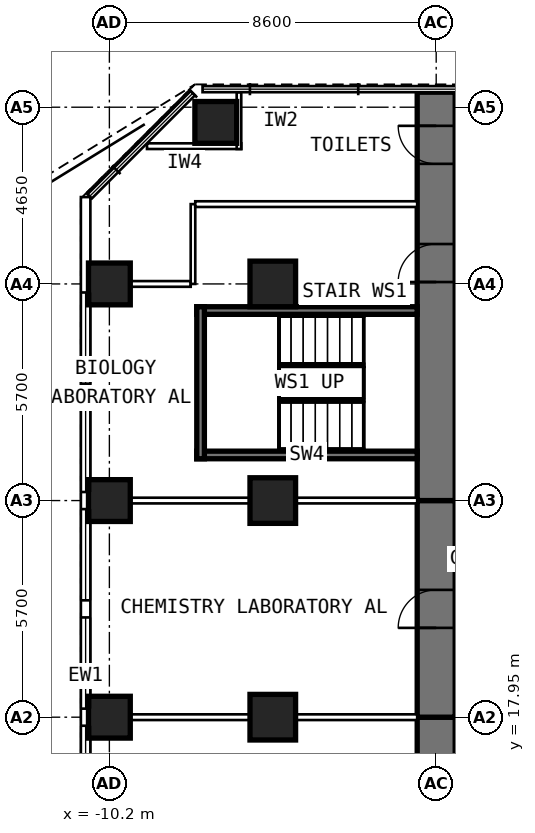
"""IFC4 building model, lengths in metres.
Left out: names, types, materials, properties, quantities, classifications, styles, units other than length and angle.
Written with IfcOpenShell. Run it as: python <this file> out.ifc"""

import sys

from ifc_helpers import new_model, si_unit, direction, frame, frame_2d, origin, origin_2d, place, context, subcontext, project, spatial, rectangle, extrude, element, fill, save


model = new_model("IFC4")
c1 = context("Model", 3, precision=1e-05, world=origin(), true_north=direction((0.0, 1.0)))
c2 = subcontext(c1, "Body", "Model", "MODEL_VIEW")
j1 = project(units=[si_unit("LENGTHUNIT", "METRE"), si_unit("PLANEANGLEUNIT", "RADIAN")], contexts=[c1])
p1 = place(None, origin())
s1 = spatial("IfcSite", under=j1, at=p1, CompositionType="ELEMENT")
p2 = place(p1, origin())
s2 = spatial("IfcBuilding", under=s1, at=p2, CompositionType="ELEMENT")
p3 = place(p2, frame((0.0, 0.0, 20.4)))
s3 = spatial("IfcBuildingStorey", under=s2, at=p3, CompositionType="ELEMENT", Elevation=20.4)
for number, where, z_axis, x_axis in (
    (1, (-10.2, 17.95, 0.0), (0.0, 0.0, 1.0), (0.0, 1.0, 0.0)),
    (2, (-10.2, 23.65, 0.0), (0.0, 0.0, 1.0), (0.0, 1.0, 0.0)),
    (3, (-10.2, 29.35, 0.0), (0.0, 0.0, 1.0), (0.0, 1.0, 0.0)),
    (4, (-7.4, 33.6, 0.0), (0.0, 0.0, 1.0), (0.0, 1.0, 0.0)),
):
    element("IfcColumn", number, at=place(p3, frame(where, z_axis=z_axis, x_axis=x_axis)), inside=s3, PredefinedType="COLUMN", context=c2, shape_type="SweptSolid", body=[
        extrude(rectangle(XDim=1.1, YDim=1.1, at=origin_2d()), origin(), (0.0, 0.0, 1.0), 4.8),
    ])
for number, where, z_axis, x_axis in (
    (5, (-5.9, 17.95, 0.0), (0.0, 0.0, 1.0), (0.0, 1.0, 0.0)),
    (6, (-5.9, 23.65, 0.0), (0.0, 0.0, 1.0), (0.0, 1.0, 0.0)),
    (7, (-5.9, 29.35, 0.0), (0.0, 0.0, 1.0), (0.0, 1.0, 0.0)),
):
    element("IfcColumn", number, at=place(p3, frame(where, z_axis=z_axis, x_axis=x_axis)), inside=s3, PredefinedType="COLUMN", context=c2, shape_type="SweptSolid", body=[
        extrude(rectangle(XDim=1.2, YDim=1.2, at=origin_2d()), origin(), (0.0, 0.0, 1.0), 4.8),
    ])
p4 = place(p3, frame((-1.6, 9.6, 0.0), z_axis=(0.0, 0.0, 1.0), x_axis=(0.0, 1.0, 0.0)))
e8 = element("IfcWall", 8, at=p4, inside=s3, PredefinedType="SHEAR", context=c2, shape_type="SweptSolid", body=[
    extrude(rectangle(XDim=8.35, YDim=1.0, at=frame_2d((4.175, 0.0))), origin(), (0.0, 0.0, 1.0), 4.8),
])
p5 = place(p4, frame((3.875, 0.0, 0.0)))
e9 = element("IfcOpeningElement", 9, at=p5, cuts=e8, PredefinedType="OPENING", context=c2, shape_type="SweptSolid", body=[
    extrude(rectangle(XDim=1.0, YDim=2.3, at=frame_2d((0.5, 1.15))), frame((0.0, 0.512, 0.0), z_axis=(0.0, -1.0, 0.0), x_axis=(1.0, 0.0, 0.0)), (0.0, 0.0, 1.0), 1.024),
])
p6 = place(p3, frame((-1.6, 17.95, 0.0), z_axis=(0.0, 0.0, 1.0), x_axis=(0.0, 1.0, 0.0)))
e10 = element("IfcWall", 10, at=p6, inside=s3, PredefinedType="SHEAR", context=c2, shape_type="SweptSolid", body=[
    extrude(rectangle(XDim=5.7, YDim=1.0, at=frame_2d((2.85, 0.0))), origin(), (0.0, 0.0, 1.0), 4.8),
])
p7 = place(p6, frame((2.35, 0.0, 0.0)))
e11 = element("IfcOpeningElement", 11, at=p7, cuts=e10, PredefinedType="OPENING", context=c2, shape_type="SweptSolid", body=[
    extrude(rectangle(XDim=1.0, YDim=2.3, at=frame_2d((0.5, 1.15))), frame((0.0, 0.512, 0.0), z_axis=(0.0, -1.0, 0.0), x_axis=(1.0, 0.0, 0.0)), (0.0, 0.0, 1.0), 1.024),
])
p8 = place(p3, frame((-1.6, 23.65, 0.0), z_axis=(0.0, 0.0, 1.0), x_axis=(0.0, 1.0, 0.0)))
e12 = element("IfcWall", 12, at=p8, inside=s3, PredefinedType="SHEAR", context=c2, shape_type="SweptSolid", body=[
    extrude(rectangle(XDim=10.745, YDim=1.0, at=frame_2d((5.373, 0.0))), origin(), (0.0, 0.0, 1.0), 4.8),
])
p9 = place(p8, frame((5.75, 0.0, 0.0)))
e13 = element("IfcOpeningElement", 13, at=p9, cuts=e12, PredefinedType="OPENING", context=c2, shape_type="SweptSolid", body=[
    extrude(rectangle(XDim=1.0, YDim=2.3, at=frame_2d((0.5, 1.15))), frame((0.0, 0.512, 0.0), z_axis=(0.0, -1.0, 0.0), x_axis=(1.0, 0.0, 0.0)), (0.0, 0.0, 1.0), 1.024),
])
p10 = place(p8, frame((8.86, 0.0, 0.0)))
e14 = element("IfcOpeningElement", 14, at=p10, cuts=e12, PredefinedType="OPENING", context=c2, shape_type="SweptSolid", body=[
    extrude(rectangle(XDim=1.0, YDim=2.3, at=frame_2d((0.5, 1.15))), frame((0.0, 0.512, 0.0), z_axis=(0.0, -1.0, 0.0), x_axis=(1.0, 0.0, 0.0)), (0.0, 0.0, 1.0), 1.024),
])
p11 = place(p3, frame((-10.825, 6.409, 0.0), z_axis=(0.0, 0.0, 1.0), x_axis=(0.0, 1.0, 0.0)))
e15 = element("IfcWall", 15, at=p11, inside=s3, PredefinedType="SOLIDWALL", context=c2, shape_type="SweptSolid", body=[
    extrude(rectangle(XDim=25.226, YDim=0.25, at=frame_2d((12.613, 0.0))), origin(), (0.0, 0.0, 1.0), 4.55),
])
p12 = place(p11, frame((0.366, 0.0, 0.9)))
e16 = element("IfcOpeningElement", 16, at=p12, cuts=e15, PredefinedType="OPENING", context=c2, shape_type="SweptSolid", body=[
    extrude(rectangle(XDim=2.4, YDim=2.6, at=frame_2d((1.2, 1.3))), frame((0.0, 0.137, 0.0), z_axis=(0.0, -1.0, 0.0), x_axis=(1.0, 0.0, 0.0)), (0.0, 0.0, 1.0), 0.274),
])
p13 = place(p11, frame((3.216, 0.0, 0.9)))
e17 = element("IfcOpeningElement", 17, at=p13, cuts=e15, PredefinedType="OPENING", context=c2, shape_type="SweptSolid", body=[
    extrude(rectangle(XDim=2.4, YDim=2.6, at=frame_2d((1.2, 1.3))), frame((0.0, 0.137, 0.0), z_axis=(0.0, -1.0, 0.0), x_axis=(1.0, 0.0, 0.0)), (0.0, 0.0, 1.0), 0.274),
])
p14 = place(p11, frame((6.366, 0.0, 0.0)))
e18 = element("IfcOpeningElement", 18, at=p14, cuts=e15, PredefinedType="OPENING", context=c2, shape_type="SweptSolid", body=[
    extrude(rectangle(XDim=1.8, YDim=2.4, at=frame_2d((0.9, 1.2))), frame((0.0, 0.137, 0.0), z_axis=(0.0, -1.0, 0.0), x_axis=(1.0, 0.0, 0.0)), (0.0, 0.0, 1.0), 0.274),
])
p15 = place(p11, frame((8.916, 0.0, 0.9)))
e19 = element("IfcOpeningElement", 19, at=p15, cuts=e15, PredefinedType="OPENING", context=c2, shape_type="SweptSolid", body=[
    extrude(rectangle(XDim=2.4, YDim=2.6, at=frame_2d((1.2, 1.3))), frame((0.0, 0.137, 0.0), z_axis=(0.0, -1.0, 0.0), x_axis=(1.0, 0.0, 0.0)), (0.0, 0.0, 1.0), 0.274),
])
p16 = place(p11, frame((11.766, 0.0, 0.9)))
e20 = element("IfcOpeningElement", 20, at=p16, cuts=e15, PredefinedType="OPENING", context=c2, shape_type="SweptSolid", body=[
    extrude(rectangle(XDim=2.4, YDim=2.6, at=frame_2d((1.2, 1.3))), frame((0.0, 0.137, 0.0), z_axis=(0.0, -1.0, 0.0), x_axis=(1.0, 0.0, 0.0)), (0.0, 0.0, 1.0), 0.274),
])
p17 = place(p11, frame((14.616, 0.0, 0.9)))
e21 = element("IfcOpeningElement", 21, at=p17, cuts=e15, PredefinedType="OPENING", context=c2, shape_type="SweptSolid", body=[
    extrude(rectangle(XDim=2.4, YDim=2.6, at=frame_2d((1.2, 1.3))), frame((0.0, 0.137, 0.0), z_axis=(0.0, -1.0, 0.0), x_axis=(1.0, 0.0, 0.0)), (0.0, 0.0, 1.0), 0.274),
])
p18 = place(p11, frame((17.466, 0.0, 0.9)))
e22 = element("IfcOpeningElement", 22, at=p18, cuts=e15, PredefinedType="OPENING", context=c2, shape_type="SweptSolid", body=[
    extrude(rectangle(XDim=2.4, YDim=2.6, at=frame_2d((1.2, 1.3))), frame((0.0, 0.137, 0.0), z_axis=(0.0, -1.0, 0.0), x_axis=(1.0, 0.0, 0.0)), (0.0, 0.0, 1.0), 0.274),
])
p19 = place(p11, frame((20.316, 0.0, 0.9)))
e23 = element("IfcOpeningElement", 23, at=p19, cuts=e15, PredefinedType="OPENING", context=c2, shape_type="SweptSolid", body=[
    extrude(rectangle(XDim=2.4, YDim=2.6, at=frame_2d((1.2, 1.3))), frame((0.0, 0.137, 0.0), z_axis=(0.0, -1.0, 0.0), x_axis=(1.0, 0.0, 0.0)), (0.0, 0.0, 1.0), 0.274),
])
p20 = place(p3, frame((-6.73, 32.975, 0.0), z_axis=(0.0, 0.0, 1.0), x_axis=(-1.0, 0.0, 0.0)))
e24 = element("IfcWall", 24, at=p20, inside=s3, PredefinedType="PARTITIONING", context=c2, shape_type="SweptSolid", body=[
    extrude(rectangle(XDim=2.48, YDim=0.15, at=frame_2d((1.24, 0.0))), origin(), (0.0, 0.0, 1.0), 4.55),
])
p21 = place(p3, frame((-6.79, 32.9, 0.0), z_axis=(0.0, 0.0, 1.0), x_axis=(0.0, 1.0, 0.0)))
e25 = element("IfcWall", 25, at=p21, inside=s3, PredefinedType="PARTITIONING", context=c2, shape_type="SweptSolid", body=[
    extrude(rectangle(XDim=1.495, YDim=0.12, at=frame_2d((0.748, 0.0))), origin(), (0.0, 0.0, 1.0), 4.55),
])
for number, where, z_axis, x_axis in (
    (26, (-2.1, 17.95, 0.0), (0.0, 0.0, 1.0), (-1.0, 0.0, 0.0)),
    (27, (-2.1, 23.65, 0.0), (0.0, 0.0, 1.0), (-1.0, 0.0, 0.0)),
):
    element("IfcWall", number, at=place(p3, frame(where, z_axis=z_axis, x_axis=x_axis)), inside=s3, PredefinedType="PARTITIONING", context=c2, shape_type="SweptSolid", body=[
        extrude(rectangle(XDim=8.6, YDim=0.15, at=frame_2d((4.3, 0.0))), origin(), (0.0, 0.0, 1.0), 3.55),
    ])
p22 = place(p3, frame((-8.06, 29.35, 0.0), z_axis=(0.0, 0.0, 1.0), x_axis=(-1.0, 0.0, 0.0)))
e28 = element("IfcWall", 28, at=p22, inside=s3, PredefinedType="PARTITIONING", context=c2, shape_type="SweptSolid", body=[
    extrude(rectangle(XDim=2.64, YDim=0.15, at=frame_2d((1.32, 0.0))), origin(), (0.0, 0.0, 1.0), 3.55),
])
p23 = place(p3, frame((-8.0, 29.35, 0.0), z_axis=(0.0, 0.0, 1.0), x_axis=(0.0, 1.0, 0.0)))
e29 = element("IfcWall", 29, at=p23, inside=s3, PredefinedType="PARTITIONING", context=c2, shape_type="SweptSolid", body=[
    extrude(rectangle(XDim=2.1, YDim=0.12, at=frame_2d((1.05, 0.0))), origin(), (0.0, 0.0, 1.0), 4.55),
])
p24 = place(p3, frame((-2.1, 31.45, 0.0), z_axis=(0.0, 0.0, 1.0), x_axis=(-1.0, 0.0, 0.0)))
e30 = element("IfcWall", 30, at=p24, inside=s3, PredefinedType="PARTITIONING", context=c2, shape_type="SweptSolid", body=[
    extrude(rectangle(XDim=5.84, YDim=0.15, at=frame_2d((2.92, 0.0))), origin(), (0.0, 0.0, 1.0), 4.55),
])
for number, where, z_axis, x_axis in (
    (31, (-2.1, 24.85, 0.0), (0.0, 0.0, 1.0), (-1.0, 0.0, 0.0)),
    (32, (-2.1, 28.65, 0.0), (0.0, 0.0, 1.0), (-1.0, 0.0, 0.0)),
):
    element("IfcWall", number, at=place(p3, frame(where, z_axis=z_axis, x_axis=x_axis)), inside=s3, PredefinedType="SHEAR", context=c2, shape_type="SweptSolid", body=[
        extrude(rectangle(XDim=5.8, YDim=0.2, at=frame_2d((2.9, 0.0))), origin(), (0.0, 0.0, 1.0), 4.53),
    ])
p25 = place(p3, frame((-7.8, 24.75, 0.0), z_axis=(0.0, 0.0, 1.0), x_axis=(0.0, 1.0, 0.0)))
e33 = element("IfcWall", 33, at=p25, inside=s3, PredefinedType="SHEAR", context=c2, shape_type="SweptSolid", body=[
    extrude(rectangle(XDim=4.0, YDim=0.2, at=frame_2d((2.0, 0.0))), origin(), (0.0, 0.0, 1.0), 4.53),
])
p26 = place(p15, origin())
e34 = element("IfcWindow", 34, at=p26, inside=s3, PartitioningType="SINGLE_PANEL", PredefinedType="WINDOW", context=c2, shape_type="SweptSolid", body=[
    extrude(rectangle(XDim=2.4, YDim=2.6, at=frame_2d((1.2, 1.3))), frame((0.0, 0.03, 0.0), z_axis=(0.0, -1.0, 0.0), x_axis=(1.0, 0.0, 0.0)), (0.0, 0.0, 1.0), 0.06),
])
fill(e19, e34)
p27 = place(p16, origin())
e35 = element("IfcWindow", 35, at=p27, inside=s3, PartitioningType="SINGLE_PANEL", PredefinedType="WINDOW", context=c2, shape_type="SweptSolid", body=[
    extrude(rectangle(XDim=2.4, YDim=2.6, at=frame_2d((1.2, 1.3))), frame((0.0, 0.03, 0.0), z_axis=(0.0, -1.0, 0.0), x_axis=(1.0, 0.0, 0.0)), (0.0, 0.0, 1.0), 0.06),
])
fill(e20, e35)
p28 = place(p17, origin())
e36 = element("IfcWindow", 36, at=p28, inside=s3, PartitioningType="SINGLE_PANEL", PredefinedType="WINDOW", context=c2, shape_type="SweptSolid", body=[
    extrude(rectangle(XDim=2.4, YDim=2.6, at=frame_2d((1.2, 1.3))), frame((0.0, 0.03, 0.0), z_axis=(0.0, -1.0, 0.0), x_axis=(1.0, 0.0, 0.0)), (0.0, 0.0, 1.0), 0.06),
])
fill(e21, e36)
p29 = place(p18, origin())
e37 = element("IfcWindow", 37, at=p29, inside=s3, PartitioningType="SINGLE_PANEL", PredefinedType="WINDOW", context=c2, shape_type="SweptSolid", body=[
    extrude(rectangle(XDim=2.4, YDim=2.6, at=frame_2d((1.2, 1.3))), frame((0.0, 0.03, 0.0), z_axis=(0.0, -1.0, 0.0), x_axis=(1.0, 0.0, 0.0)), (0.0, 0.0, 1.0), 0.06),
])
fill(e22, e37)
p30 = place(p19, origin())
e38 = element("IfcWindow", 38, at=p30, inside=s3, PartitioningType="SINGLE_PANEL", PredefinedType="WINDOW", context=c2, shape_type="SweptSolid", body=[
    extrude(rectangle(XDim=2.4, YDim=2.6, at=frame_2d((1.2, 1.3))), frame((0.0, 0.03, 0.0), z_axis=(0.0, -1.0, 0.0), x_axis=(1.0, 0.0, 0.0)), (0.0, 0.0, 1.0), 0.06),
])
fill(e23, e38)
p31 = place(p7, origin())
e39 = element("IfcDoor", 39, at=p31, inside=s3, OperationType="SINGLE_SWING_LEFT", PredefinedType="DOOR", context=c2, shape_type="SweptSolid", body=[
    extrude(rectangle(XDim=1.0, YDim=2.3, at=frame_2d((0.5, 1.15))), frame((0.0, 0.25, 0.0), z_axis=(0.0, -1.0, 0.0), x_axis=(1.0, 0.0, 0.0)), (0.0, 0.0, 1.0), 0.5),
])
fill(e11, e39)
p32 = place(p9, origin())
e40 = element("IfcDoor", 40, at=p32, inside=s3, OperationType="SINGLE_SWING_LEFT", PredefinedType="DOOR", context=c2, shape_type="SweptSolid", body=[
    extrude(rectangle(XDim=1.0, YDim=2.3, at=frame_2d((0.5, 1.15))), frame((0.0, 0.25, 0.0), z_axis=(0.0, -1.0, 0.0), x_axis=(1.0, 0.0, 0.0)), (0.0, 0.0, 1.0), 0.5),
])
fill(e13, e40)
p33 = place(p10, origin())
e41 = element("IfcDoor", 41, at=p33, inside=s3, OperationType="SINGLE_SWING_RIGHT", PredefinedType="DOOR", context=c2, shape_type="SweptSolid", body=[
    extrude(rectangle(XDim=1.0, YDim=2.3, at=frame_2d((0.5, 1.15))), frame((0.0, 0.25, 0.0), z_axis=(0.0, -1.0, 0.0), x_axis=(1.0, 0.0, 0.0)), (0.0, 0.0, 1.0), 0.5),
])
fill(e14, e41)
save(model, sys.argv[1])
